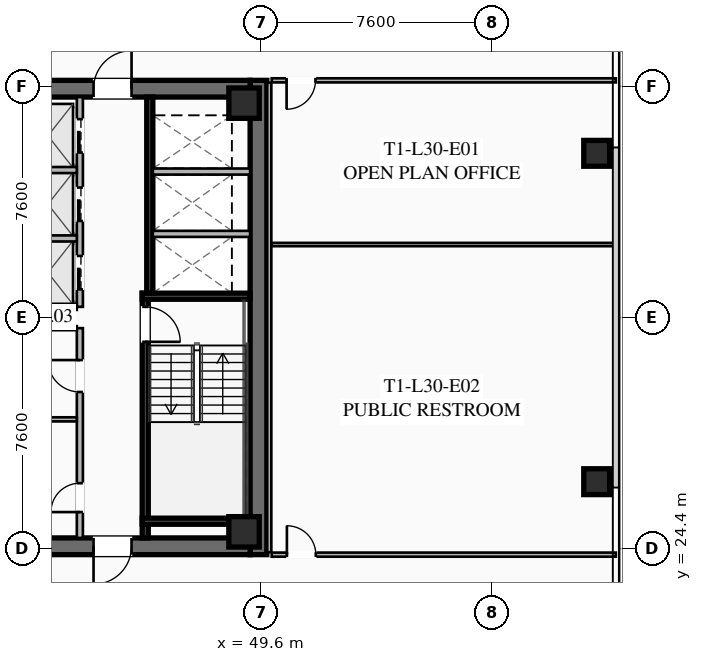
"""IFC4 building model, lengths in metres.
Left out: names, types, materials, properties, quantities, classifications, styles, units other than length and angle.
Written with IfcOpenShell. Run it as: python <this file> out.ifc"""

import sys

from ifc_helpers import new_model, si_unit, direction, frame, frame_2d, origin, origin_2d, place, context, subcontext, project, spatial, rectangle, hollow_rectangle, extrude, element, fill, save


model = new_model("IFC4")
c1 = context("Model", 3, precision=1e-05, world=origin(), true_north=direction((0.0, 1.0)))
c2 = subcontext(c1, "Body", "Model", "MODEL_VIEW")
j1 = project(units=[si_unit("LENGTHUNIT", "METRE"), si_unit("PLANEANGLEUNIT", "RADIAN")], contexts=[c1])
p1 = place(None, origin())
s1 = spatial("IfcSite", under=j1, at=p1, CompositionType="ELEMENT")
p2 = place(p1, origin())
s2 = spatial("IfcBuilding", under=s1, at=p2, CompositionType="ELEMENT")
p3 = place(p2, frame((0.0, 0.0, 114.4)))
s3 = spatial("IfcBuildingStorey", under=s2, at=p3, CompositionType="ELEMENT", Elevation=114.4)
p4 = place(p3, frame((49.525, 39.8, 0.0), z_axis=(0.0, 0.0, 1.0), x_axis=(0.0, -1.0, 0.0)))
e1 = element("IfcWall", 1, at=p4, inside=s3, PredefinedType="SHEAR", context=c2, shape_type="SweptSolid", body=[
    extrude(rectangle(XDim=15.6, YDim=0.55, at=frame_2d((7.8, 0.0))), origin(), (0.0, 0.0, 1.0), 3.55),
])
p5 = place(p3, frame((49.25, 24.475, 0.0), z_axis=(0.0, 0.0, 1.0), x_axis=(-1.0, 0.0, 0.0)))
e2 = element("IfcWall", 2, at=p5, inside=s3, PredefinedType="SHEAR", context=c2, shape_type="SweptSolid", body=[
    extrude(rectangle(XDim=14.5, YDim=0.55, at=frame_2d((7.25, 0.0))), origin(), (0.0, 0.0, 1.0), 3.55),
])
p6 = place(p5, frame((8.95, 0.0, 0.0)))
e3 = element("IfcOpeningElement", 3, at=p6, cuts=e2, PredefinedType="OPENING", context=c2, shape_type="SweptSolid", body=[
    extrude(rectangle(XDim=1.25, YDim=2.25, at=frame_2d((0.625, 1.125))), frame((0.0, 0.285, 0.0), z_axis=(0.0, -1.0, 0.0), x_axis=(1.0, 0.0, 0.0)), (0.0, 0.0, 1.0), 0.57),
])
p7 = place(p5, frame((3.9, 0.0, 0.0)))
e4 = element("IfcOpeningElement", 4, at=p7, cuts=e2, PredefinedType="OPENING", context=c2, shape_type="SweptSolid", body=[
    extrude(rectangle(XDim=1.25, YDim=2.25, at=frame_2d((0.625, 1.125))), frame((0.0, 0.285, 0.0), z_axis=(0.0, -1.0, 0.0), x_axis=(1.0, 0.0, 0.0)), (0.0, 0.0, 1.0), 0.57),
])
p8 = place(p3, frame((34.75, 39.525, 0.0), z_axis=(0.0, 0.0, 1.0), x_axis=(1.0, 0.0, 0.0)))
e5 = element("IfcWall", 5, at=p8, inside=s3, PredefinedType="SHEAR", context=c2, shape_type="SweptSolid", body=[
    extrude(rectangle(XDim=14.5, YDim=0.55, at=frame_2d((7.25, 0.0))), origin(), (0.0, 0.0, 1.0), 3.55),
])
p9 = place(p8, frame((4.3, 0.0, 0.0)))
e6 = element("IfcOpeningElement", 6, at=p9, cuts=e5, PredefinedType="OPENING", context=c2, shape_type="SweptSolid", body=[
    extrude(rectangle(XDim=1.25, YDim=2.25, at=frame_2d((0.625, 1.125))), frame((0.0, 0.285, 0.0), z_axis=(0.0, -1.0, 0.0), x_axis=(1.0, 0.0, 0.0)), (0.0, 0.0, 1.0), 0.57),
])
p10 = place(p8, frame((9.35, 0.0, 0.0)))
e7 = element("IfcOpeningElement", 7, at=p10, cuts=e5, PredefinedType="OPENING", context=c2, shape_type="SweptSolid", body=[
    extrude(rectangle(XDim=1.25, YDim=2.25, at=frame_2d((0.625, 1.125))), frame((0.0, 0.285, 0.0), z_axis=(0.0, -1.0, 0.0), x_axis=(1.0, 0.0, 0.0)), (0.0, 0.0, 1.0), 0.57),
])
for number, where, z_axis, x_axis in (
    (8, (49.05, 24.95, 0.0), (0.0, 0.0, 1.0), (1.0, 0.0, 0.0)),
    (9, (49.05, 39.05, 0.0), (0.0, 0.0, 1.0), (1.0, 0.0, 0.0)),
):
    element("IfcColumn", number, at=place(p3, frame(where, z_axis=z_axis, x_axis=x_axis)), inside=s3, PredefinedType="COLUMN", context=c2, shape_type="SweptSolid", body=[
        extrude(hollow_rectangle(XDim=1.0, YDim=1.0, WallThickness=0.04, at=origin_2d()), origin(), (0.0, 0.0, 1.0), 3.37),
    ])
for number, where, z_axis, x_axis in (
    (10, (60.65, 26.6, 0.0), (0.0, 0.0, 1.0), (1.0, 0.0, 0.0)),
    (11, (60.65, 37.4, 0.0), (0.0, 0.0, 1.0), (1.0, 0.0, 0.0)),
):
    element("IfcColumn", number, at=place(p3, frame(where, z_axis=z_axis, x_axis=x_axis)), inside=s3, PredefinedType="COLUMN", context=c2, shape_type="SweptSolid", body=[
        extrude(hollow_rectangle(XDim=0.85, YDim=0.85, WallThickness=0.035, at=origin_2d()), origin(), (0.0, 0.0, 1.0), 3.37),
    ])
p11 = place(p3, frame((45.8, 32.8, 0.0), z_axis=(0.0, 0.0, 1.0), x_axis=(0.0, -1.0, 0.0)))
e12 = element("IfcWall", 12, at=p11, inside=s3, PredefinedType="SHEAR", context=c2, shape_type="SweptSolid", body=[
    extrude(rectangle(XDim=8.05, YDim=0.2, at=frame_2d((4.025, 0.0))), origin(), (0.0, 0.0, 1.0), 3.37),
])
p12 = place(p11, frame((0.45, 0.0, 0.0)))
e13 = element("IfcOpeningElement", 13, at=p12, cuts=e12, PredefinedType="OPENING", context=c2, shape_type="SweptSolid", body=[
    extrude(rectangle(XDim=1.15, YDim=2.2, at=frame_2d((0.575, 1.1))), frame((0.0, 0.11, 0.0), z_axis=(0.0, -1.0, 0.0), x_axis=(1.0, 0.0, 0.0)), (0.0, 0.0, 1.0), 0.22),
])
for number, where, z_axis, x_axis in (
    (14, (45.7, 32.7, 0.0), (0.0, 0.0, 1.0), (1.0, 0.0, 0.0)),
    (15, (45.7, 25.3, 0.0), (0.0, 0.0, 1.0), (1.0, 0.0, 0.0)),
):
    element("IfcWall", number, at=place(p3, frame(where, z_axis=z_axis, x_axis=x_axis)), inside=s3, PredefinedType="SHEAR", context=c2, shape_type="SweptSolid", body=[
        extrude(rectangle(XDim=3.55, YDim=0.2, at=frame_2d((1.775, 0.0))), origin(), (0.0, 0.0, 1.0), 3.37),
    ])
p13 = place(p3, frame((45.95, 39.25, 0.0), z_axis=(0.0, 0.0, 1.0), x_axis=(0.0, -1.0, 0.0)))
e16 = element("IfcWall", 16, at=p13, inside=s3, PredefinedType="SHEAR", context=c2, shape_type="SweptSolid", body=[
    extrude(rectangle(XDim=6.45, YDim=0.2, at=frame_2d((3.225, 0.0))), origin(), (0.0, 0.0, 1.0), 3.37),
])
for number, where, z_axis, x_axis in (
    (17, (46.05, 34.75, 0.0), (0.0, 0.0, 1.0), (1.0, 0.0, 0.0)),
    (18, (46.05, 36.8, 0.0), (0.0, 0.0, 1.0), (1.0, 0.0, 0.0)),
):
    element("IfcWall", number, at=place(p3, frame(where, z_axis=z_axis, x_axis=x_axis)), inside=s3, PredefinedType="SOLIDWALL", context=c2, shape_type="SweptSolid", body=[
        extrude(rectangle(XDim=3.2, YDim=0.2, at=frame_2d((1.6, 0.0))), origin(), (0.0, 0.0, 1.0), 3.37),
    ])
p14 = place(p3, frame((43.65, 24.75, 0.0), z_axis=(0.0, 0.0, 1.0), x_axis=(0.0, 1.0, 0.0)))
e19 = element("IfcWall", 19, at=p14, inside=s3, PredefinedType="SOLIDWALL", context=c2, shape_type="SweptSolid", body=[
    extrude(rectangle(XDim=6.9, YDim=0.2, at=frame_2d((3.45, 0.0))), origin(), (0.0, 0.0, 1.0), 2.723),
])
p15 = place(p14, frame((0.85, 0.0, 0.0)))
e20 = element("IfcOpeningElement", 20, at=p15, cuts=e19, PredefinedType="OPENING", context=c2, shape_type="SweptSolid", body=[
    extrude(rectangle(XDim=0.95, YDim=2.05, at=frame_2d((0.475, 1.025))), frame((0.0, 0.11, 0.0), z_axis=(0.0, -1.0, 0.0), x_axis=(1.0, 0.0, 0.0)), (0.0, 0.0, 1.0), 0.22),
])
p16 = place(p14, frame((4.8, 0.0, 0.0)))
e21 = element("IfcOpeningElement", 21, at=p16, cuts=e19, PredefinedType="OPENING", context=c2, shape_type="SweptSolid", body=[
    extrude(rectangle(XDim=1.05, YDim=2.2, at=frame_2d((0.525, 1.1))), frame((0.0, 0.11, 0.0), z_axis=(0.0, -1.0, 0.0), x_axis=(1.0, 0.0, 0.0)), (0.0, 0.0, 1.0), 0.22),
])
for number, where, z_axis, x_axis in (
    (22, (41.67, 31.65, 0.0), (0.0, 0.0, 1.0), (1.0, 0.0, 0.0)),
    (23, (41.67, 28.65, 0.0), (0.0, 0.0, 1.0), (1.0, 0.0, 0.0)),
):
    element("IfcWall", number, at=place(p3, frame(where, z_axis=z_axis, x_axis=x_axis)), inside=s3, PredefinedType="PARTITIONING", context=c2, shape_type="SweptSolid", body=[
        extrude(rectangle(XDim=1.88, YDim=0.135, at=frame_2d((0.94, 0.0))), origin(), (0.0, 0.0, 1.0), 2.723),
    ])
p17 = place(p3, frame((43.65, 32.35, 0.0), z_axis=(0.0, 0.0, 1.0), x_axis=(0.0, 1.0, 0.0)))
e24 = element("IfcWall", 24, at=p17, inside=s3, PredefinedType="SOLIDWALL", context=c2, shape_type="SweptSolid", body=[
    extrude(rectangle(XDim=6.9, YDim=0.2, at=frame_2d((3.45, 0.0))), origin(), (0.0, 0.0, 1.0), 3.37),
])
p18 = place(p17, frame((0.575, 0.0, 0.0)))
e25 = element("IfcOpeningElement", 25, at=p18, cuts=e24, PredefinedType="OPENING", context=c2, shape_type="SweptSolid", body=[
    extrude(rectangle(XDim=1.1, YDim=2.2, at=frame_2d((0.55, 1.1))), frame((0.0, 0.11, 0.0), z_axis=(0.0, -1.0, 0.0), x_axis=(1.0, 0.0, 0.0)), (0.0, 0.0, 1.0), 0.22),
])
p19 = place(p17, frame((2.825, 0.0, 0.0)))
e26 = element("IfcOpeningElement", 26, at=p19, cuts=e24, PredefinedType="OPENING", context=c2, shape_type="SweptSolid", body=[
    extrude(rectangle(XDim=1.1, YDim=2.2, at=frame_2d((0.55, 1.1))), frame((0.0, 0.11, 0.0), z_axis=(0.0, -1.0, 0.0), x_axis=(1.0, 0.0, 0.0)), (0.0, 0.0, 1.0), 0.22),
])
p20 = place(p17, frame((5.075, 0.0, 0.0)))
e27 = element("IfcOpeningElement", 27, at=p20, cuts=e24, PredefinedType="OPENING", context=c2, shape_type="SweptSolid", body=[
    extrude(rectangle(XDim=1.1, YDim=2.2, at=frame_2d((0.55, 1.1))), frame((0.0, 0.11, 0.0), z_axis=(0.0, -1.0, 0.0), x_axis=(1.0, 0.0, 0.0)), (0.0, 0.0, 1.0), 0.22),
])
for number, where, z_axis, x_axis in (
    (28, (41.67, 32.35, 0.0), (0.0, 0.0, 1.0), (1.0, 0.0, 0.0)),
    (29, (41.67, 34.6, 0.0), (0.0, 0.0, 1.0), (1.0, 0.0, 0.0)),
    (30, (41.67, 36.85, 0.0), (0.0, 0.0, 1.0), (1.0, 0.0, 0.0)),
):
    element("IfcWall", number, at=place(p3, frame(where, z_axis=z_axis, x_axis=x_axis)), inside=s3, PredefinedType="SOLIDWALL", context=c2, shape_type="SweptSolid", body=[
        extrude(rectangle(XDim=1.88, YDim=0.2, at=frame_2d((0.94, 0.0))), origin(), (0.0, 0.0, 1.0), 3.37),
    ])
p21 = place(p3, frame((49.88, 39.72, 0.0), z_axis=(0.0, 0.0, 1.0), x_axis=(0.0, -1.0, 0.0)))
e31 = element("IfcWall", 31, at=p21, inside=s3, PredefinedType="PARTITIONING", context=c2, shape_type="SweptSolid", body=[
    extrude(rectangle(XDim=15.44, YDim=0.135, at=frame_2d((7.72, 0.0))), origin(), (0.0, 0.0, 1.0), 2.723),
])
p22 = place(p3, frame((61.28, 39.8, 0.0), z_axis=(0.0, 0.0, 1.0), x_axis=(-1.0, 0.0, 0.0)))
e32 = element("IfcWall", 32, at=p22, inside=s3, PredefinedType="PARTITIONING", context=c2, shape_type="SweptSolid", body=[
    extrude(rectangle(XDim=11.32, YDim=0.135, at=frame_2d((5.66, 0.0))), origin(), (0.0, 0.0, 1.0), 2.723),
])
p23 = place(p22, frame((9.88, 0.0, 0.0)))
e33 = element("IfcOpeningElement", 33, at=p23, cuts=e32, PredefinedType="OPENING", context=c2, shape_type="SweptSolid", body=[
    extrude(rectangle(XDim=0.95, YDim=2.05, at=frame_2d((0.475, 1.025))), frame((0.0, 0.077, 0.0), z_axis=(0.0, -1.0, 0.0), x_axis=(1.0, 0.0, 0.0)), (0.0, 0.0, 1.0), 0.155),
])
p24 = place(p3, frame((49.96, 24.2, 0.0), z_axis=(0.0, 0.0, 1.0), x_axis=(1.0, 0.0, 0.0)))
e34 = element("IfcWall", 34, at=p24, inside=s3, PredefinedType="PARTITIONING", context=c2, shape_type="SweptSolid", body=[
    extrude(rectangle(XDim=11.32, YDim=0.135, at=frame_2d((5.66, 0.0))), origin(), (0.0, 0.0, 1.0), 2.723),
])
p25 = place(p24, frame((0.5, 0.0, 0.0)))
e35 = element("IfcOpeningElement", 35, at=p25, cuts=e34, PredefinedType="OPENING", context=c2, shape_type="SweptSolid", body=[
    extrude(rectangle(XDim=0.95, YDim=2.05, at=frame_2d((0.475, 1.025))), frame((0.0, 0.077, 0.0), z_axis=(0.0, -1.0, 0.0), x_axis=(1.0, 0.0, 0.0)), (0.0, 0.0, 1.0), 0.155),
])
p26 = place(p3, frame((49.96, 34.4, 0.0), z_axis=(0.0, 0.0, 1.0), x_axis=(1.0, 0.0, 0.0)))
e36 = element("IfcWall", 36, at=p26, inside=s3, PredefinedType="PARTITIONING", context=c2, shape_type="SweptSolid", body=[
    extrude(rectangle(XDim=11.32, YDim=0.11, at=frame_2d((5.66, 0.0))), origin(), (0.0, 0.0, 1.0), 2.723),
])
p27 = place(p10, origin())
e37 = element("IfcDoor", 37, at=p27, inside=s3, OperationType="SINGLE_SWING_RIGHT", PredefinedType="DOOR", context=c2, shape_type="SweptSolid", body=[
    extrude(rectangle(XDim=1.25, YDim=2.25, at=frame_2d((0.625, 1.125))), frame((0.0, 0.025, 0.0), z_axis=(0.0, -1.0, 0.0), x_axis=(1.0, 0.0, 0.0)), (0.0, 0.0, 1.0), 0.05),
])
fill(e7, e37)
p28 = place(p7, origin())
e38 = element("IfcDoor", 38, at=p28, inside=s3, OperationType="SINGLE_SWING_RIGHT", PredefinedType="DOOR", context=c2, shape_type="SweptSolid", body=[
    extrude(rectangle(XDim=1.25, YDim=2.25, at=frame_2d((0.625, 1.125))), frame((0.0, 0.025, 0.0), z_axis=(0.0, -1.0, 0.0), x_axis=(1.0, 0.0, 0.0)), (0.0, 0.0, 1.0), 0.05),
])
fill(e4, e38)
p29 = place(p12, origin())
e39 = element("IfcDoor", 39, at=p29, inside=s3, OperationType="SINGLE_SWING_RIGHT", PredefinedType="DOOR", context=c2, shape_type="SweptSolid", body=[
    extrude(rectangle(XDim=1.15, YDim=2.2, at=frame_2d((0.575, 1.1))), frame((0.0, 0.025, 0.0), z_axis=(0.0, -1.0, 0.0), x_axis=(1.0, 0.0, 0.0)), (0.0, 0.0, 1.0), 0.05),
])
fill(e13, e39)
p30 = place(p15, origin())
e40 = element("IfcDoor", 40, at=p30, inside=s3, OperationType="SINGLE_SWING_LEFT", PredefinedType="DOOR", context=c2, shape_type="SweptSolid", body=[
    extrude(rectangle(XDim=0.95, YDim=2.05, at=frame_2d((0.475, 1.025))), frame((0.0, 0.025, 0.0), z_axis=(0.0, -1.0, 0.0), x_axis=(1.0, 0.0, 0.0)), (0.0, 0.0, 1.0), 0.05),
])
fill(e20, e40)
p31 = place(p16, origin())
e41 = element("IfcDoor", 41, at=p31, inside=s3, OperationType="SINGLE_SWING_RIGHT", PredefinedType="DOOR", context=c2, shape_type="SweptSolid", body=[
    extrude(rectangle(XDim=1.05, YDim=2.2, at=frame_2d((0.525, 1.1))), frame((0.0, 0.025, 0.0), z_axis=(0.0, -1.0, 0.0), x_axis=(1.0, 0.0, 0.0)), (0.0, 0.0, 1.0), 0.05),
])
fill(e21, e41)
p32 = place(p23, origin())
e42 = element("IfcDoor", 42, at=p32, inside=s3, OperationType="SINGLE_SWING_RIGHT", PredefinedType="DOOR", context=c2, shape_type="SweptSolid", body=[
    extrude(rectangle(XDim=0.95, YDim=2.05, at=frame_2d((0.475, 1.025))), frame((0.0, 0.025, 0.0), z_axis=(0.0, -1.0, 0.0), x_axis=(1.0, 0.0, 0.0)), (0.0, 0.0, 1.0), 0.05),
])
fill(e33, e42)
p33 = place(p25, origin())
e43 = element("IfcDoor", 43, at=p33, inside=s3, OperationType="SINGLE_SWING_LEFT", PredefinedType="DOOR", context=c2, shape_type="SweptSolid", body=[
    extrude(rectangle(XDim=0.95, YDim=2.05, at=frame_2d((0.475, 1.025))), frame((0.0, 0.025, 0.0), z_axis=(0.0, -1.0, 0.0), x_axis=(1.0, 0.0, 0.0)), (0.0, 0.0, 1.0), 0.05),
])
fill(e35, e43)
p34 = place(p18, origin())
e44 = element("IfcDoor", 44, at=p34, inside=s3, OperationType="SLIDING_TO_LEFT", PredefinedType="DOOR", context=c2, shape_type="SweptSolid", body=[
    extrude(rectangle(XDim=1.1, YDim=2.2, at=frame_2d((0.55, 1.1))), frame((0.0, 0.025, 0.0), z_axis=(0.0, -1.0, 0.0), x_axis=(1.0, 0.0, 0.0)), (0.0, 0.0, 1.0), 0.05),
])
fill(e25, e44)
p35 = place(p19, origin())
e45 = element("IfcDoor", 45, at=p35, inside=s3, OperationType="SLIDING_TO_LEFT", PredefinedType="DOOR", context=c2, shape_type="SweptSolid", body=[
    extrude(rectangle(XDim=1.1, YDim=2.2, at=frame_2d((0.55, 1.1))), frame((0.0, 0.025, 0.0), z_axis=(0.0, -1.0, 0.0), x_axis=(1.0, 0.0, 0.0)), (0.0, 0.0, 1.0), 0.05),
])
fill(e26, e45)
p36 = place(p20, origin())
e46 = element("IfcDoor", 46, at=p36, inside=s3, OperationType="SLIDING_TO_LEFT", PredefinedType="DOOR", context=c2, shape_type="SweptSolid", body=[
    extrude(rectangle(XDim=1.1, YDim=2.2, at=frame_2d((0.55, 1.1))), frame((0.0, 0.025, 0.0), z_axis=(0.0, -1.0, 0.0), x_axis=(1.0, 0.0, 0.0)), (0.0, 0.0, 1.0), 0.05),
])
fill(e27, e46)
save(model, sys.argv[1])
